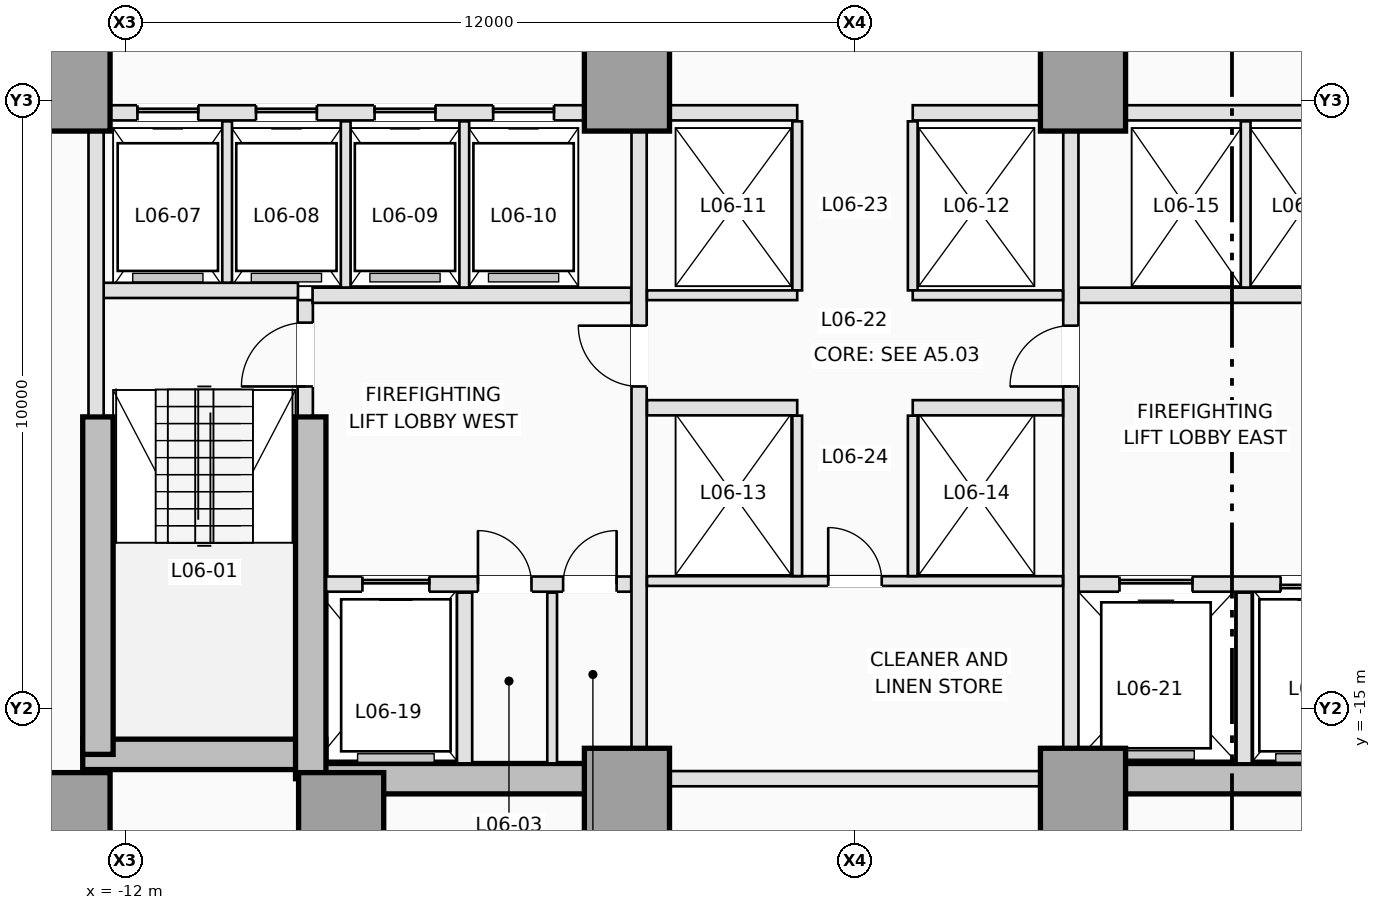
"""IFC4 building model, lengths in metres.
Left out: names, types, materials, properties, quantities, classifications, styles, units other than length and angle.
Written with IfcOpenShell. Run it as: python <this file> out.ifc"""

import sys

from ifc_helpers import new_model, si_unit, direction, frame, frame_2d, origin, origin_2d, place, context, subcontext, project, spatial, rectangle, extrude, element, fill, save


model = new_model("IFC4")
c1 = context("Model", 3, precision=1e-05, world=origin(), true_north=direction((0.0, 1.0)))
c2 = subcontext(c1, "Body", "Model", "MODEL_VIEW")
j1 = project(units=[si_unit("LENGTHUNIT", "METRE"), si_unit("PLANEANGLEUNIT", "RADIAN")], contexts=[c1])
p1 = place(None, origin())
s1 = spatial("IfcSite", under=j1, at=p1, CompositionType="ELEMENT")
p2 = place(p1, origin())
s2 = spatial("IfcBuilding", under=s1, at=p2, CompositionType="ELEMENT")
p3 = place(p2, frame((0.0, 0.0, 27.6)))
s3 = spatial("IfcBuildingStorey", under=s2, at=p3, CompositionType="ELEMENT", Elevation=27.6)
p4 = place(p3, frame((-12.7, -15.75, 0.0), z_axis=(0.0, 0.0, 1.0), x_axis=(1.0, 0.0, 0.0)))
e1 = element("IfcWall", 1, at=p4, inside=s3, PredefinedType="SHEAR", context=c2, shape_type="SweptSolid", body=[
    extrude(rectangle(XDim=4.0, YDim=0.5, at=frame_2d((2.0, 0.0))), origin(), (0.0, 0.0, 1.0), 3.5),
])
for number, where, z_axis, x_axis in (
    (2, (-8.95, -16.15, 0.0), (0.0, 0.0, 1.0), (1.0, 0.0, 0.0)),
    (3, (3.75, -16.15, 0.0), (0.0, 0.0, 1.0), (1.0, 0.0, 0.0)),
):
    element("IfcWall", number, at=place(p3, frame(where, z_axis=z_axis, x_axis=x_axis)), inside=s3, PredefinedType="SHEAR", context=c2, shape_type="SweptSolid", body=[
        extrude(rectangle(XDim=5.2, YDim=0.5, at=frame_2d((2.6, 0.0))), origin(), (0.0, 0.0, 1.0), 3.5),
    ])
p5 = place(p3, frame((-12.45, -15.75, 0.0), z_axis=(0.0, 0.0, 1.0), x_axis=(0.0, 1.0, 0.0)))
e4 = element("IfcWall", 4, at=p5, inside=s3, PredefinedType="SHEAR", context=c2, shape_type="SweptSolid", body=[
    extrude(rectangle(XDim=5.55, YDim=0.5, at=frame_2d((2.775, 0.0))), origin(), (0.0, 0.0, 1.0), 3.5),
])
p6 = place(p3, frame((-8.95, -16.15, 0.0), z_axis=(0.0, 0.0, 1.0), x_axis=(0.0, 1.0, 0.0)))
e5 = element("IfcWall", 5, at=p6, inside=s3, PredefinedType="SHEAR", context=c2, shape_type="SweptSolid", body=[
    extrude(rectangle(XDim=5.95, YDim=0.5, at=frame_2d((2.975, 0.0))), origin(), (0.0, 0.0, 1.0), 3.5),
])
for number, where, z_axis, x_axis in (
    (6, (-12.95, -16.75, 0.0), (0.0, 0.0, 1.0), (1.0, 0.0, 0.0)),
    (7, (-8.45, -16.75, 0.0), (0.0, 0.0, 1.0), (1.0, 0.0, 0.0)),
    (8, (-3.75, -16.35, 0.0), (0.0, 0.0, 1.0), (1.0, 0.0, 0.0)),
    (9, (3.75, -16.35, 0.0), (0.0, 0.0, 1.0), (1.0, 0.0, 0.0)),
    (10, (-12.95, -4.8, 0.0), (0.0, 0.0, 1.0), (1.0, 0.0, 0.0)),
    (11, (-3.75, -4.8, 0.0), (0.0, 0.0, 1.0), (1.0, 0.0, 0.0)),
    (12, (3.75, -4.8, 0.0), (0.0, 0.0, 1.0), (1.0, 0.0, 0.0)),
):
    element("IfcColumn", number, at=place(p3, frame(where, z_axis=z_axis, x_axis=x_axis)), inside=s3, PredefinedType="COLUMN", context=c2, shape_type="SweptSolid", body=[
        extrude(rectangle(XDim=1.4, YDim=1.4, at=origin_2d()), origin(), (0.0, 0.0, 1.0), 3.5),
    ])
p7 = place(p3, frame((-9.04, -10.18, 0.0), z_axis=(0.0, 0.0, 1.0), x_axis=(0.0, 1.0, 0.0)))
e13 = element("IfcWall", 13, at=p7, inside=s3, PredefinedType="PARTITIONING", context=c2, shape_type="SweptSolid", body=[
    extrude(rectangle(XDim=1.9, YDim=0.25, at=frame_2d((0.95, 0.0))), origin(), (0.0, 0.0, 1.0), 3.25),
])
p8 = place(p7, frame((0.48, 0.0, 0.0)))
e14 = element("IfcOpeningElement", 14, at=p8, cuts=e13, PredefinedType="OPENING", context=c2, shape_type="SweptSolid", body=[
    extrude(rectangle(XDim=1.05, YDim=2.15, at=frame_2d((0.525, 1.075))), frame((0.0, 0.135, 0.0), z_axis=(0.0, -1.0, 0.0), x_axis=(1.0, 0.0, 0.0)), (0.0, 0.0, 1.0), 0.27),
])
p9 = place(p3, frame((-12.38, -8.12, 0.0), z_axis=(0.0, 0.0, 1.0), x_axis=(1.0, 0.0, 0.0)))
e15 = element("IfcWall", 15, at=p9, inside=s3, PredefinedType="PARTITIONING", context=c2, shape_type="SweptSolid", body=[
    extrude(rectangle(XDim=3.22, YDim=0.25, at=frame_2d((1.61, 0.0))), origin(), (0.0, 0.0, 1.0), 3.25),
])
p10 = place(p3, frame((-12.48, -10.18, 0.0), z_axis=(0.0, 0.0, 1.0), x_axis=(0.0, 1.0, 0.0)))
e16 = element("IfcWall", 16, at=p10, inside=s3, PredefinedType="PARTITIONING", context=c2, shape_type="SweptSolid", body=[
    extrude(rectangle(XDim=4.678, YDim=0.25, at=frame_2d((2.339, 0.0))), origin(), (0.0, 0.0, 1.0), 3.25),
])
p11 = place(p3, frame((-8.698, -12.95, 0.0), z_axis=(0.0, 0.0, 1.0), x_axis=(1.0, 0.0, 0.0)))
e17 = element("IfcWall", 17, at=p11, inside=s3, PredefinedType="PARTITIONING", context=c2, shape_type="SweptSolid", body=[
    extrude(rectangle(XDim=5.018, YDim=0.25, at=frame_2d((2.509, 0.0))), origin(), (0.0, 0.0, 1.0), 3.25),
])
p12 = place(p11, frame((0.598, 0.0, 0.0)))
e18 = element("IfcOpeningElement", 18, at=p12, cuts=e17, PredefinedType="OPENING", context=c2, shape_type="SweptSolid", body=[
    extrude(rectangle(XDim=1.1, YDim=2.15, at=frame_2d((0.55, 1.075))), frame((0.0, 0.135, 0.0), z_axis=(0.0, -1.0, 0.0), x_axis=(1.0, 0.0, 0.0)), (0.0, 0.0, 1.0), 0.27),
])
p13 = place(p11, frame((2.498, 0.0, 0.0)))
e19 = element("IfcOpeningElement", 19, at=p13, cuts=e17, PredefinedType="OPENING", context=c2, shape_type="SweptSolid", body=[
    extrude(rectangle(XDim=0.88, YDim=2.1, at=frame_2d((0.44, 1.05))), frame((0.0, 0.135, 0.0), z_axis=(0.0, -1.0, 0.0), x_axis=(1.0, 0.0, 0.0)), (0.0, 0.0, 1.0), 0.27),
])
p14 = place(p11, frame((3.898, 0.0, 0.0)))
e20 = element("IfcOpeningElement", 20, at=p14, cuts=e17, PredefinedType="OPENING", context=c2, shape_type="SweptSolid", body=[
    extrude(rectangle(XDim=0.88, YDim=2.1, at=frame_2d((0.44, 1.05))), frame((0.0, 0.135, 0.0), z_axis=(0.0, -1.0, 0.0), x_axis=(1.0, 0.0, 0.0)), (0.0, 0.0, 1.0), 0.27),
])
p15 = place(p3, frame((3.68, -12.95, 0.0), z_axis=(0.0, 0.0, 1.0), x_axis=(1.0, 0.0, 0.0)))
e21 = element("IfcWall", 21, at=p15, inside=s3, PredefinedType="PARTITIONING", context=c2, shape_type="SweptSolid", body=[
    extrude(rectangle(XDim=5.018, YDim=0.25, at=frame_2d((2.509, 0.0))), origin(), (0.0, 0.0, 1.0), 3.25),
])
p16 = place(p15, frame((3.32, 0.0, 0.0)))
e22 = element("IfcOpeningElement", 22, at=p16, cuts=e21, PredefinedType="OPENING", context=c2, shape_type="SweptSolid", body=[
    extrude(rectangle(XDim=1.1, YDim=2.15, at=frame_2d((0.55, 1.075))), frame((0.0, 0.135, 0.0), z_axis=(0.0, -1.0, 0.0), x_axis=(1.0, 0.0, 0.0)), (0.0, 0.0, 1.0), 0.27),
])
p17 = place(p15, frame((0.67, 0.0, 0.0)))
e23 = element("IfcOpeningElement", 23, at=p17, cuts=e21, PredefinedType="OPENING", context=c2, shape_type="SweptSolid", body=[
    extrude(rectangle(XDim=1.2, YDim=2.15, at=frame_2d((0.6, 1.075))), frame((0.0, 0.135, 0.0), z_axis=(0.0, -1.0, 0.0), x_axis=(1.0, 0.0, 0.0)), (0.0, 0.0, 1.0), 0.27),
])
p18 = place(p3, frame((-6.42, -15.898, 0.0), z_axis=(0.0, 0.0, 1.0), x_axis=(0.0, 1.0, 0.0)))
e24 = element("IfcWall", 24, at=p18, inside=s3, PredefinedType="PARTITIONING", context=c2, shape_type="SweptSolid", body=[
    extrude(rectangle(XDim=2.808, YDim=0.25, at=frame_2d((1.404, 0.0))), origin(), (0.0, 0.0, 1.0), 3.25),
])
p19 = place(p3, frame((-4.98, -15.898, 0.0), z_axis=(0.0, 0.0, 1.0), x_axis=(0.0, 1.0, 0.0)))
e25 = element("IfcWall", 25, at=p19, inside=s3, PredefinedType="PARTITIONING", context=c2, shape_type="SweptSolid", body=[
    extrude(rectangle(XDim=2.808, YDim=0.16, at=frame_2d((1.404, 0.0))), origin(), (0.0, 0.0, 1.0), 3.25),
])
p20 = place(p3, frame((6.4, -15.898, 0.0), z_axis=(0.0, 0.0, 1.0), x_axis=(0.0, 1.0, 0.0)))
e26 = element("IfcWall", 26, at=p20, inside=s3, PredefinedType="PARTITIONING", context=c2, shape_type="SweptSolid", body=[
    extrude(rectangle(XDim=2.808, YDim=0.25, at=frame_2d((1.404, 0.0))), origin(), (0.0, 0.0, 1.0), 3.25),
])
for number, where, z_axis, x_axis in (
    (27, (-8.92, -8.2, 0.0), (0.0, 0.0, 1.0), (1.0, 0.0, 0.0)),
    (28, (3.68, -8.2, 0.0), (0.0, 0.0, 1.0), (1.0, 0.0, 0.0)),
):
    element("IfcWall", number, at=place(p3, frame(where, z_axis=z_axis, x_axis=x_axis)), inside=s3, PredefinedType="PARTITIONING", context=c2, shape_type="SweptSolid", body=[
        extrude(rectangle(XDim=5.24, YDim=0.25, at=frame_2d((2.62, 0.0))), origin(), (0.0, 0.0, 1.0), 3.25),
    ])
p21 = place(p3, frame((-3.55, -15.648, 0.0), z_axis=(0.0, 0.0, 1.0), x_axis=(0.0, 1.0, 0.0)))
e29 = element("IfcWall", 29, at=p21, inside=s3, PredefinedType="PARTITIONING", context=c2, shape_type="SweptSolid", body=[
    extrude(rectangle(XDim=10.146, YDim=0.25, at=frame_2d((5.073, 0.0))), origin(), (0.0, 0.0, 1.0), 3.25),
])
p22 = place(p21, frame((5.948, 0.0, 0.0)))
e30 = element("IfcOpeningElement", 30, at=p22, cuts=e29, PredefinedType="OPENING", context=c2, shape_type="SweptSolid", body=[
    extrude(rectangle(XDim=1.0, YDim=2.15, at=frame_2d((0.5, 1.075))), frame((0.0, 0.135, 0.0), z_axis=(0.0, -1.0, 0.0), x_axis=(1.0, 0.0, 0.0)), (0.0, 0.0, 1.0), 0.27),
])
p23 = place(p3, frame((3.55, -15.648, 0.0), z_axis=(0.0, 0.0, 1.0), x_axis=(0.0, 1.0, 0.0)))
e31 = element("IfcWall", 31, at=p23, inside=s3, PredefinedType="PARTITIONING", context=c2, shape_type="SweptSolid", body=[
    extrude(rectangle(XDim=10.146, YDim=0.25, at=frame_2d((5.073, 0.0))), origin(), (0.0, 0.0, 1.0), 3.25),
])
p24 = place(p23, frame((5.948, 0.0, 0.0)))
e32 = element("IfcOpeningElement", 32, at=p24, cuts=e31, PredefinedType="OPENING", context=c2, shape_type="SweptSolid", body=[
    extrude(rectangle(XDim=1.0, YDim=2.15, at=frame_2d((0.5, 1.075))), frame((0.0, 0.135, 0.0), z_axis=(0.0, -1.0, 0.0), x_axis=(1.0, 0.0, 0.0)), (0.0, 0.0, 1.0), 0.27),
])
p25 = place(p3, frame((-12.248, -5.2, 0.0), z_axis=(0.0, 0.0, 1.0), x_axis=(1.0, 0.0, 0.0)))
e33 = element("IfcWall", 33, at=p25, inside=s3, PredefinedType="PARTITIONING", context=c2, shape_type="SweptSolid", body=[
    extrude(rectangle(XDim=7.796, YDim=0.25, at=frame_2d((3.898, 0.0))), origin(), (0.0, 0.0, 1.0), 3.25),
])
p26 = place(p25, frame((0.448, 0.0, 0.0)))
e34 = element("IfcOpeningElement", 34, at=p26, cuts=e33, PredefinedType="OPENING", context=c2, shape_type="SweptSolid", body=[
    extrude(rectangle(XDim=1.0, YDim=2.15, at=frame_2d((0.5, 1.075))), frame((0.0, 0.135, 0.0), z_axis=(0.0, -1.0, 0.0), x_axis=(1.0, 0.0, 0.0)), (0.0, 0.0, 1.0), 0.27),
])
p27 = place(p25, frame((2.398, 0.0, 0.0)))
e35 = element("IfcOpeningElement", 35, at=p27, cuts=e33, PredefinedType="OPENING", context=c2, shape_type="SweptSolid", body=[
    extrude(rectangle(XDim=1.0, YDim=2.15, at=frame_2d((0.5, 1.075))), frame((0.0, 0.135, 0.0), z_axis=(0.0, -1.0, 0.0), x_axis=(1.0, 0.0, 0.0)), (0.0, 0.0, 1.0), 0.27),
])
p28 = place(p25, frame((4.348, 0.0, 0.0)))
e36 = element("IfcOpeningElement", 36, at=p28, cuts=e33, PredefinedType="OPENING", context=c2, shape_type="SweptSolid", body=[
    extrude(rectangle(XDim=1.0, YDim=2.15, at=frame_2d((0.5, 1.075))), frame((0.0, 0.135, 0.0), z_axis=(0.0, -1.0, 0.0), x_axis=(1.0, 0.0, 0.0)), (0.0, 0.0, 1.0), 0.27),
])
p29 = place(p25, frame((6.298, 0.0, 0.0)))
e37 = element("IfcOpeningElement", 37, at=p29, cuts=e33, PredefinedType="OPENING", context=c2, shape_type="SweptSolid", body=[
    extrude(rectangle(XDim=1.0, YDim=2.15, at=frame_2d((0.5, 1.075))), frame((0.0, 0.135, 0.0), z_axis=(0.0, -1.0, 0.0), x_axis=(1.0, 0.0, 0.0)), (0.0, 0.0, 1.0), 0.27),
])
p30 = place(p3, frame((4.452, -5.2, 0.0), z_axis=(0.0, 0.0, 1.0), x_axis=(1.0, 0.0, 0.0)))
e38 = element("IfcWall", 38, at=p30, inside=s3, PredefinedType="PARTITIONING", context=c2, shape_type="SweptSolid", body=[
    extrude(rectangle(XDim=7.796, YDim=0.25, at=frame_2d((3.898, 0.0))), origin(), (0.0, 0.0, 1.0), 3.25),
])
for number, where, z_axis, x_axis in (
    (39, (-3.048, -5.2, 0.0), (0.0, 0.0, 1.0), (1.0, 0.0, 0.0)),
    (40, (0.95, -5.2, 0.0), (0.0, 0.0, 1.0), (1.0, 0.0, 0.0)),
):
    element("IfcWall", number, at=place(p3, frame(where, z_axis=z_axis, x_axis=x_axis)), inside=s3, PredefinedType="PARTITIONING", context=c2, shape_type="SweptSolid", body=[
        extrude(rectangle(XDim=2.098, YDim=0.25, at=frame_2d((1.049, 0.0))), origin(), (0.0, 0.0, 1.0), 3.25),
    ])
p31 = place(p3, frame((-10.325, -7.993, 0.0), z_axis=(0.0, 0.0, 1.0), x_axis=(0.0, 1.0, 0.0)))
e41 = element("IfcWall", 41, at=p31, inside=s3, PredefinedType="PARTITIONING", context=c2, shape_type="SweptSolid", body=[
    extrude(rectangle(XDim=2.653, YDim=0.16, at=frame_2d((1.326, 0.0))), origin(), (0.0, 0.0, 1.0), 3.25),
])
for number, where, z_axis, x_axis in (
    (42, (-8.375, -8.073, 0.0), (0.0, 0.0, 1.0), (0.0, 1.0, 0.0)),
    (43, (-6.425, -8.073, 0.0), (0.0, 0.0, 1.0), (0.0, 1.0, 0.0)),
    (44, (6.425, -8.073, 0.0), (0.0, 0.0, 1.0), (0.0, 1.0, 0.0)),
):
    element("IfcWall", number, at=place(p3, frame(where, z_axis=z_axis, x_axis=x_axis)), inside=s3, PredefinedType="PARTITIONING", context=c2, shape_type="SweptSolid", body=[
        extrude(rectangle(XDim=2.733, YDim=0.16, at=frame_2d((1.366, 0.0))), origin(), (0.0, 0.0, 1.0), 3.25),
    ])
p32 = place(p3, frame((-3.048, -16.15, 0.0), z_axis=(0.0, 0.0, 1.0), x_axis=(1.0, 0.0, 0.0)))
e45 = element("IfcWall", 45, at=p32, inside=s3, PredefinedType="PARTITIONING", context=c2, shape_type="SweptSolid", body=[
    extrude(rectangle(XDim=6.096, YDim=0.25, at=frame_2d((3.048, 0.0))), origin(), (0.0, 0.0, 1.0), 2.3),
])
for number, where, z_axis, x_axis in (
    (46, (-0.95, -8.12, 0.0), (0.0, 0.0, 1.0), (0.0, 1.0, 0.0)),
    (47, (0.95, -8.12, 0.0), (0.0, 0.0, 1.0), (0.0, 1.0, 0.0)),
):
    element("IfcWall", number, at=place(p3, frame(where, z_axis=z_axis, x_axis=x_axis)), inside=s3, PredefinedType="PARTITIONING", context=c2, shape_type="SweptSolid", body=[
        extrude(rectangle(XDim=2.78, YDim=0.16, at=frame_2d((1.39, 0.0))), origin(), (0.0, 0.0, 1.0), 3.25),
    ])
for number, where, z_axis, x_axis in (
    (48, (-3.42, -8.2, 0.0), (0.0, 0.0, 1.0), (1.0, 0.0, 0.0)),
    (49, (0.95, -8.2, 0.0), (0.0, 0.0, 1.0), (1.0, 0.0, 0.0)),
):
    element("IfcWall", number, at=place(p3, frame(where, z_axis=z_axis, x_axis=x_axis)), inside=s3, PredefinedType="PARTITIONING", context=c2, shape_type="SweptSolid", body=[
        extrude(rectangle(XDim=2.47, YDim=0.16, at=frame_2d((1.235, 0.0))), origin(), (0.0, 0.0, 1.0), 3.25),
    ])
for number, where, z_axis, x_axis in (
    (50, (-3.42, -10.05, 0.0), (0.0, 0.0, 1.0), (1.0, 0.0, 0.0)),
    (51, (0.95, -10.05, 0.0), (0.0, 0.0, 1.0), (1.0, 0.0, 0.0)),
):
    element("IfcWall", number, at=place(p3, frame(where, z_axis=z_axis, x_axis=x_axis)), inside=s3, PredefinedType="PARTITIONING", context=c2, shape_type="SweptSolid", body=[
        extrude(rectangle(XDim=2.47, YDim=0.25, at=frame_2d((1.235, 0.0))), origin(), (0.0, 0.0, 1.0), 3.25),
    ])
p33 = place(p3, frame((-3.42, -12.9, 0.0), z_axis=(0.0, 0.0, 1.0), x_axis=(1.0, 0.0, 0.0)))
e52 = element("IfcWall", 52, at=p33, inside=s3, PredefinedType="PARTITIONING", context=c2, shape_type="SweptSolid", body=[
    extrude(rectangle(XDim=6.84, YDim=0.16, at=frame_2d((3.42, 0.0))), origin(), (0.0, 0.0, 1.0), 3.25),
])
p34 = place(p33, frame((2.98, 0.0, 0.0)))
e53 = element("IfcOpeningElement", 53, at=p34, cuts=e52, PredefinedType="OPENING", context=c2, shape_type="SweptSolid", body=[
    extrude(rectangle(XDim=0.88, YDim=2.12, at=frame_2d((0.44, 1.06))), frame((0.0, 0.09, 0.0), z_axis=(0.0, -1.0, 0.0), x_axis=(1.0, 0.0, 0.0)), (0.0, 0.0, 1.0), 0.18),
])
for number, where, z_axis, x_axis in (
    (54, (-0.95, -12.818, 0.0), (0.0, 0.0, 1.0), (0.0, 1.0, 0.0)),
    (55, (0.95, -12.818, 0.0), (0.0, 0.0, 1.0), (0.0, 1.0, 0.0)),
):
    element("IfcWall", number, at=place(p3, frame(where, z_axis=z_axis, x_axis=x_axis)), inside=s3, PredefinedType="PARTITIONING", context=c2, shape_type="SweptSolid", body=[
        extrude(rectangle(XDim=2.638, YDim=0.16, at=frame_2d((1.319, 0.0))), origin(), (0.0, 0.0, 1.0), 3.25),
    ])
p35 = place(p26, origin())
e56 = element("IfcDoor", 56, at=p35, inside=s3, OperationType="SLIDING_TO_LEFT", PredefinedType="DOOR", context=c2, shape_type="SweptSolid", body=[
    extrude(rectangle(XDim=1.0, YDim=2.15, at=frame_2d((0.5, 1.075))), frame((0.0, 0.025, 0.0), z_axis=(0.0, -1.0, 0.0), x_axis=(1.0, 0.0, 0.0)), (0.0, 0.0, 1.0), 0.05),
])
fill(e34, e56)
p36 = place(p27, origin())
e57 = element("IfcDoor", 57, at=p36, inside=s3, OperationType="SLIDING_TO_LEFT", PredefinedType="DOOR", context=c2, shape_type="SweptSolid", body=[
    extrude(rectangle(XDim=1.0, YDim=2.15, at=frame_2d((0.5, 1.075))), frame((0.0, 0.025, 0.0), z_axis=(0.0, -1.0, 0.0), x_axis=(1.0, 0.0, 0.0)), (0.0, 0.0, 1.0), 0.05),
])
fill(e35, e57)
p37 = place(p28, origin())
e58 = element("IfcDoor", 58, at=p37, inside=s3, OperationType="SLIDING_TO_LEFT", PredefinedType="DOOR", context=c2, shape_type="SweptSolid", body=[
    extrude(rectangle(XDim=1.0, YDim=2.15, at=frame_2d((0.5, 1.075))), frame((0.0, 0.025, 0.0), z_axis=(0.0, -1.0, 0.0), x_axis=(1.0, 0.0, 0.0)), (0.0, 0.0, 1.0), 0.05),
])
fill(e36, e58)
p38 = place(p29, origin())
e59 = element("IfcDoor", 59, at=p38, inside=s3, OperationType="SLIDING_TO_LEFT", PredefinedType="DOOR", context=c2, shape_type="SweptSolid", body=[
    extrude(rectangle(XDim=1.0, YDim=2.15, at=frame_2d((0.5, 1.075))), frame((0.0, 0.025, 0.0), z_axis=(0.0, -1.0, 0.0), x_axis=(1.0, 0.0, 0.0)), (0.0, 0.0, 1.0), 0.05),
])
fill(e37, e59)
p39 = place(p12, origin())
e60 = element("IfcDoor", 60, at=p39, inside=s3, OperationType="SLIDING_TO_LEFT", PredefinedType="DOOR", context=c2, shape_type="SweptSolid", body=[
    extrude(rectangle(XDim=1.1, YDim=2.15, at=frame_2d((0.55, 1.075))), frame((0.0, 0.025, 0.0), z_axis=(0.0, -1.0, 0.0), x_axis=(1.0, 0.0, 0.0)), (0.0, 0.0, 1.0), 0.05),
])
fill(e18, e60)
p40 = place(p16, origin())
e61 = element("IfcDoor", 61, at=p40, inside=s3, OperationType="SLIDING_TO_RIGHT", PredefinedType="DOOR", context=c2, shape_type="SweptSolid", body=[
    extrude(rectangle(XDim=1.1, YDim=2.15, at=frame_2d((0.55, 1.075))), frame((0.0, 0.025, 0.0), z_axis=(0.0, -1.0, 0.0), x_axis=(1.0, 0.0, 0.0)), (0.0, 0.0, 1.0), 0.05),
])
fill(e22, e61)
p41 = place(p17, origin())
e62 = element("IfcDoor", 62, at=p41, inside=s3, OperationType="SLIDING_TO_LEFT", PredefinedType="DOOR", context=c2, shape_type="SweptSolid", body=[
    extrude(rectangle(XDim=1.2, YDim=2.15, at=frame_2d((0.6, 1.075))), frame((0.0, 0.025, 0.0), z_axis=(0.0, -1.0, 0.0), x_axis=(1.0, 0.0, 0.0)), (0.0, 0.0, 1.0), 0.05),
])
fill(e23, e62)
p42 = place(p8, origin())
e63 = element("IfcDoor", 63, at=p42, inside=s3, OperationType="SINGLE_SWING_LEFT", PredefinedType="DOOR", context=c2, shape_type="SweptSolid", body=[
    extrude(rectangle(XDim=1.05, YDim=2.15, at=frame_2d((0.525, 1.075))), frame((0.0, 0.025, 0.0), z_axis=(0.0, -1.0, 0.0), x_axis=(1.0, 0.0, 0.0)), (0.0, 0.0, 1.0), 0.05),
])
fill(e14, e63)
p43 = place(p13, origin())
e64 = element("IfcDoor", 64, at=p43, inside=s3, OperationType="SINGLE_SWING_LEFT", PredefinedType="TRAPDOOR", context=c2, shape_type="SweptSolid", body=[
    extrude(rectangle(XDim=0.88, YDim=2.1, at=frame_2d((0.44, 1.05))), frame((0.0, 0.025, 0.0), z_axis=(0.0, -1.0, 0.0), x_axis=(1.0, 0.0, 0.0)), (0.0, 0.0, 1.0), 0.05),
])
fill(e19, e64)
p44 = place(p14, origin())
e65 = element("IfcDoor", 65, at=p44, inside=s3, OperationType="SINGLE_SWING_RIGHT", PredefinedType="TRAPDOOR", context=c2, shape_type="SweptSolid", body=[
    extrude(rectangle(XDim=0.88, YDim=2.1, at=frame_2d((0.44, 1.05))), frame((0.0, 0.025, 0.0), z_axis=(0.0, -1.0, 0.0), x_axis=(1.0, 0.0, 0.0)), (0.0, 0.0, 1.0), 0.05),
])
fill(e20, e65)
p45 = place(p22, origin())
e66 = element("IfcDoor", 66, at=p45, inside=s3, OperationType="SINGLE_SWING_RIGHT", PredefinedType="DOOR", context=c2, shape_type="SweptSolid", body=[
    extrude(rectangle(XDim=1.0, YDim=2.15, at=frame_2d((0.5, 1.075))), frame((0.0, 0.025, 0.0), z_axis=(0.0, -1.0, 0.0), x_axis=(1.0, 0.0, 0.0)), (0.0, 0.0, 1.0), 0.05),
])
fill(e30, e66)
p46 = place(p24, origin())
e67 = element("IfcDoor", 67, at=p46, inside=s3, OperationType="SINGLE_SWING_LEFT", PredefinedType="DOOR", context=c2, shape_type="SweptSolid", body=[
    extrude(rectangle(XDim=1.0, YDim=2.15, at=frame_2d((0.5, 1.075))), frame((0.0, 0.025, 0.0), z_axis=(0.0, -1.0, 0.0), x_axis=(1.0, 0.0, 0.0)), (0.0, 0.0, 1.0), 0.05),
])
fill(e32, e67)
p47 = place(p34, origin())
e68 = element("IfcDoor", 68, at=p47, inside=s3, OperationType="SINGLE_SWING_LEFT", PredefinedType="DOOR", context=c2, shape_type="SweptSolid", body=[
    extrude(rectangle(XDim=0.88, YDim=2.12, at=frame_2d((0.44, 1.06))), frame((0.0, 0.025, 0.0), z_axis=(0.0, -1.0, 0.0), x_axis=(1.0, 0.0, 0.0)), (0.0, 0.0, 1.0), 0.05),
])
fill(e53, e68)
save(model, sys.argv[1])
